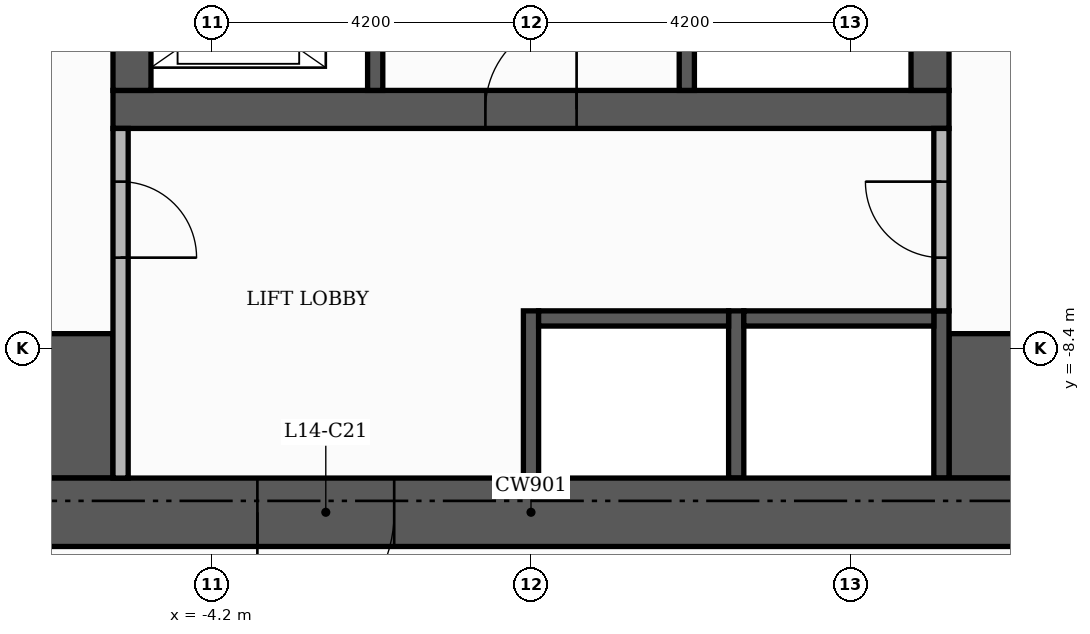
"""IFC4 building model, lengths in metres.
Left out: names, types, materials, properties, quantities, classifications, styles, units other than length and angle.
Written with IfcOpenShell. Run it as: python <this file> out.ifc"""

import sys

from ifc_helpers import new_model, si_unit, direction, frame, frame_2d, origin, place, context, subcontext, project, spatial, rectangle, extrude, element, fill, save


model = new_model("IFC4")
c1 = context("Model", 3, precision=1e-05, world=origin(), true_north=direction((0.0, 1.0)))
c2 = subcontext(c1, "Body", "Model", "MODEL_VIEW")
j1 = project(units=[si_unit("LENGTHUNIT", "METRE"), si_unit("PLANEANGLEUNIT", "RADIAN")], contexts=[c1])
p1 = place(None, origin())
s1 = spatial("IfcSite", under=j1, at=p1, CompositionType="ELEMENT")
p2 = place(p1, origin())
s2 = spatial("IfcBuilding", under=s1, at=p2, CompositionType="ELEMENT")
p3 = place(p2, frame((0.0, 0.0, 62.1)))
s3 = spatial("IfcBuildingStorey", under=s2, at=p3, CompositionType="ELEMENT", Elevation=62.1)
p4 = place(p3, frame((-5.5, -5.25, 0.0), z_axis=(0.0, 0.0, 1.0), x_axis=(1.0, 0.0, 0.0)))
e1 = element("IfcWall", 1, at=p4, inside=s3, PredefinedType="SHEAR", context=c2, shape_type="SweptSolid", body=[
    extrude(rectangle(XDim=11.0, YDim=0.5, at=frame_2d((5.5, 0.0))), origin(), (0.0, 0.0, 1.0), 3.48),
])
p5 = place(p4, frame((4.9, 0.0, 0.0)))
e2 = element("IfcOpeningElement", 2, at=p5, cuts=e1, PredefinedType="OPENING", context=c2, shape_type="SweptSolid", body=[
    extrude(rectangle(XDim=1.2, YDim=2.1, at=frame_2d((0.6, 1.05))), frame((0.0, 0.26, 0.0), z_axis=(0.0, -1.0, 0.0), x_axis=(1.0, 0.0, 0.0)), (0.0, 0.0, 1.0), 0.52),
])
for number, where, z_axis, x_axis in (
    (3, (-5.25, -5.0, 0.0), (0.0, 0.0, 1.0), (0.0, 1.0, 0.0)),
    (4, (5.25, -5.0, 0.0), (0.0, 0.0, 1.0), (0.0, 1.0, 0.0)),
):
    element("IfcWall", number, at=place(p3, frame(where, z_axis=z_axis, x_axis=x_axis)), inside=s3, PredefinedType="SHEAR", context=c2, shape_type="SweptSolid", body=[
        extrude(rectangle(XDim=10.5, YDim=0.5, at=frame_2d((5.25, 0.0))), origin(), (0.0, 0.0, 1.0), 3.48),
    ])
for number, where, z_axis, x_axis in (
    (5, (-10.1, -9.15, 0.0), (0.0, 0.0, 1.0), (1.0, 0.0, 0.0)),
    (6, (5.5, -9.15, 0.0), (0.0, 0.0, 1.0), (1.0, 0.0, 0.0)),
):
    element("IfcWall", number, at=place(p3, frame(where, z_axis=z_axis, x_axis=x_axis)), inside=s3, PredefinedType="SHEAR", context=c2, shape_type="SweptSolid", body=[
        extrude(rectangle(XDim=4.6, YDim=1.9, at=frame_2d((2.3, 0.0))), origin(), (0.0, 0.0, 1.0), 3.48),
    ])
p6 = place(p3, frame((2.05, -5.0, 0.0), z_axis=(0.0, 0.0, 1.0), x_axis=(0.0, 1.0, 0.0)))
e7 = element("IfcWall", 7, at=p6, inside=s3, PredefinedType="SHEAR", context=c2, shape_type="SweptSolid", body=[
    extrude(rectangle(XDim=6.6, YDim=0.2, at=frame_2d((3.3, 0.0))), origin(), (0.0, 0.0, 1.0), 3.48),
])
p7 = place(p6, frame((5.25, 0.0, 0.0)))
e8 = element("IfcOpeningElement", 8, at=p7, cuts=e7, PredefinedType="OPENING", context=c2, shape_type="SweptSolid", body=[
    extrude(rectangle(XDim=1.0, YDim=2.1, at=frame_2d((0.5, 1.05))), frame((0.0, 0.11, 0.0), z_axis=(0.0, -1.0, 0.0), x_axis=(1.0, 0.0, 0.0)), (0.0, 0.0, 1.0), 0.22),
])
for number, where, z_axis, x_axis in (
    (9, (0.0, -10.1, 0.0), (0.0, 0.0, 1.0), (0.0, 1.0, 0.0)),
    (10, (2.7, -10.1, 0.0), (0.0, 0.0, 1.0), (0.0, 1.0, 0.0)),
    (11, (5.4, -10.1, 0.0), (0.0, 0.0, 1.0), (0.0, 1.0, 0.0)),
):
    element("IfcWall", number, at=place(p3, frame(where, z_axis=z_axis, x_axis=x_axis)), inside=s3, PredefinedType="SHEAR", context=c2, shape_type="SweptSolid", body=[
        extrude(rectangle(XDim=2.2, YDim=0.2, at=frame_2d((1.1, 0.0))), origin(), (0.0, 0.0, 1.0), 3.48),
    ])
for number, where, z_axis, x_axis in (
    (12, (0.1, -8.0, 0.0), (0.0, 0.0, 1.0), (1.0, 0.0, 0.0)),
    (13, (2.8, -8.0, 0.0), (0.0, 0.0, 1.0), (1.0, 0.0, 0.0)),
):
    element("IfcWall", number, at=place(p3, frame(where, z_axis=z_axis, x_axis=x_axis)), inside=s3, PredefinedType="SHEAR", context=c2, shape_type="SweptSolid", body=[
        extrude(rectangle(XDim=2.5, YDim=0.2, at=frame_2d((1.25, 0.0))), origin(), (0.0, 0.0, 1.0), 3.48),
    ])
p8 = place(p3, frame((-2.05, -5.0, 0.0), z_axis=(0.0, 0.0, 1.0), x_axis=(0.0, 1.0, 0.0)))
e14 = element("IfcWall", 14, at=p8, inside=s3, PredefinedType="SHEAR", context=c2, shape_type="SweptSolid", body=[
    extrude(rectangle(XDim=3.4, YDim=0.2, at=frame_2d((1.7, 0.0))), origin(), (0.0, 0.0, 1.0), 3.48),
])
p9 = place(p8, frame((0.55, 0.0, 0.0)))
e15 = element("IfcOpeningElement", 15, at=p9, cuts=e14, PredefinedType="OPENING", context=c2, shape_type="SweptSolid", body=[
    extrude(rectangle(XDim=1.1, YDim=2.1, at=frame_2d((0.55, 1.05))), frame((0.0, 0.11, 0.0), z_axis=(0.0, -1.0, 0.0), x_axis=(1.0, 0.0, 0.0)), (0.0, 0.0, 1.0), 0.22),
])
p10 = place(p8, frame((2.45, 0.0, 0.0)))
e16 = element("IfcOpeningElement", 16, at=p10, cuts=e14, PredefinedType="OPENING", context=c2, shape_type="SweptSolid", body=[
    extrude(rectangle(XDim=0.8, YDim=2.1, at=frame_2d((0.4, 1.05))), frame((0.0, 0.11, 0.0), z_axis=(0.0, -1.0, 0.0), x_axis=(1.0, 0.0, 0.0)), (0.0, 0.0, 1.0), 0.22),
])
p11 = place(p3, frame((-11.0, -10.55, 0.0), z_axis=(0.0, 0.0, 1.0), x_axis=(1.0, 0.0, 0.0)))
e17 = element("IfcWall", 17, at=p11, inside=s3, PredefinedType="SHEAR", context=c2, shape_type="SweptSolid", body=[
    extrude(rectangle(XDim=22.0, YDim=0.9, at=frame_2d((11.0, 0.0))), origin(), (0.0, 0.0, 1.0), 3.48),
])
p12 = place(p11, frame((7.4, 0.0, 0.0)))
e18 = element("IfcOpeningElement", 18, at=p12, cuts=e17, PredefinedType="OPENING", context=c2, shape_type="SweptSolid", body=[
    extrude(rectangle(XDim=1.8, YDim=2.2, at=frame_2d((0.9, 1.1))), frame((0.0, 0.46, 0.0), z_axis=(0.0, -1.0, 0.0), x_axis=(1.0, 0.0, 0.0)), (0.0, 0.0, 1.0), 0.92),
])
p13 = place(p3, frame((-5.4, -10.1, 0.0), z_axis=(0.0, 0.0, 1.0), x_axis=(0.0, 1.0, 0.0)))
e19 = element("IfcWall", 19, at=p13, inside=s3, PredefinedType="PARTITIONING", context=c2, shape_type="SweptSolid", body=[
    extrude(rectangle(XDim=4.6, YDim=0.2, at=frame_2d((2.3, 0.0))), origin(), (0.0, 0.0, 1.0), 3.48),
])
p14 = place(p13, frame((2.9, 0.0, 0.0)))
e20 = element("IfcOpeningElement", 20, at=p14, cuts=e19, PredefinedType="OPENING", context=c2, shape_type="SweptSolid", body=[
    extrude(rectangle(XDim=1.0, YDim=2.1, at=frame_2d((0.5, 1.05))), frame((0.0, 0.11, 0.0), z_axis=(0.0, -1.0, 0.0), x_axis=(1.0, 0.0, 0.0)), (0.0, 0.0, 1.0), 0.22),
])
p15 = place(p3, frame((5.4, -7.9, 0.0), z_axis=(0.0, 0.0, 1.0), x_axis=(0.0, 1.0, 0.0)))
e21 = element("IfcWall", 21, at=p15, inside=s3, PredefinedType="PARTITIONING", context=c2, shape_type="SweptSolid", body=[
    extrude(rectangle(XDim=2.4, YDim=0.2, at=frame_2d((1.2, 0.0))), origin(), (0.0, 0.0, 1.0), 3.48),
])
p16 = place(p15, frame((0.7, 0.0, 0.0)))
e22 = element("IfcOpeningElement", 22, at=p16, cuts=e21, PredefinedType="OPENING", context=c2, shape_type="SweptSolid", body=[
    extrude(rectangle(XDim=1.0, YDim=2.1, at=frame_2d((0.5, 1.05))), frame((0.0, 0.11, 0.0), z_axis=(0.0, -1.0, 0.0), x_axis=(1.0, 0.0, 0.0)), (0.0, 0.0, 1.0), 0.22),
])
p17 = place(p5, origin())
e23 = element("IfcDoor", 23, at=p17, inside=s3, OperationType="SINGLE_SWING_RIGHT", PredefinedType="DOOR", context=c2, shape_type="SweptSolid", body=[
    extrude(rectangle(XDim=1.2, YDim=2.1, at=frame_2d((0.6, 1.05))), frame((0.0, 0.025, 0.0), z_axis=(0.0, -1.0, 0.0), x_axis=(1.0, 0.0, 0.0)), (0.0, 0.0, 1.0), 0.05),
])
fill(e2, e23)
p18 = place(p14, frame((1.0, 0.0, 0.0), z_axis=(0.0, 0.0, 1.0), x_axis=(-1.0, 0.0, 0.0)))
e24 = element("IfcDoor", 24, at=p18, inside=s3, OperationType="SINGLE_SWING_LEFT", PredefinedType="DOOR", context=c2, shape_type="SweptSolid", body=[
    extrude(rectangle(XDim=1.0, YDim=2.1, at=frame_2d((0.5, 1.05))), frame((0.0, 0.025, 0.0), z_axis=(0.0, -1.0, 0.0), x_axis=(1.0, 0.0, 0.0)), (0.0, 0.0, 1.0), 0.05),
])
fill(e20, e24)
p19 = place(p16, origin())
e25 = element("IfcDoor", 25, at=p19, inside=s3, OperationType="SINGLE_SWING_RIGHT", PredefinedType="DOOR", context=c2, shape_type="SweptSolid", body=[
    extrude(rectangle(XDim=1.0, YDim=2.1, at=frame_2d((0.5, 1.05))), frame((0.0, 0.025, 0.0), z_axis=(0.0, -1.0, 0.0), x_axis=(1.0, 0.0, 0.0)), (0.0, 0.0, 1.0), 0.05),
])
fill(e22, e25)
p20 = place(p12, frame((1.8, 0.0, 0.0), z_axis=(0.0, 0.0, 1.0), x_axis=(-1.0, 0.0, 0.0)))
e26 = element("IfcDoor", 26, at=p20, inside=s3, OperationType="DOUBLE_DOOR_SINGLE_SWING", PredefinedType="DOOR", context=c2, shape_type="SweptSolid", body=[
    extrude(rectangle(XDim=1.8, YDim=2.2, at=frame_2d((0.9, 1.1))), frame((0.0, 0.025, 0.0), z_axis=(0.0, -1.0, 0.0), x_axis=(1.0, 0.0, 0.0)), (0.0, 0.0, 1.0), 0.05),
])
fill(e18, e26)
save(model, sys.argv[1])
